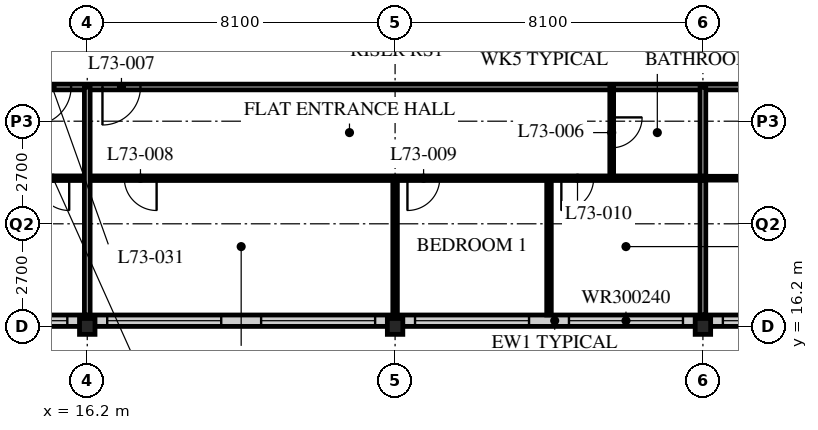
"""IFC4 building model, lengths in metres.
Left out: names, types, materials, properties, quantities, classifications, styles, units other than length and angle.
Written with IfcOpenShell. Run it as: python <this file> out.ifc"""

import sys

from ifc_helpers import new_model, si_unit, direction, frame, frame_2d, origin, origin_2d, place, context, subcontext, project, spatial, rectangle, i_section, extrude, element, fill, save


model = new_model("IFC4")
c1 = context("Model", 3, precision=1e-05, world=origin(), true_north=direction((0.0, 1.0)))
c2 = subcontext(c1, "Body", "Model", "MODEL_VIEW")
j1 = project(units=[si_unit("LENGTHUNIT", "METRE"), si_unit("PLANEANGLEUNIT", "RADIAN")], contexts=[c1])
p1 = place(None, origin())
s1 = spatial("IfcSite", under=j1, at=p1, CompositionType="ELEMENT")
p2 = place(p1, origin())
s2 = spatial("IfcBuilding", under=s1, at=p2, CompositionType="ELEMENT")
p3 = place(p2, frame((0.0, 0.0, 285.3)))
s3 = spatial("IfcBuildingStorey", under=s2, at=p3, CompositionType="ELEMENT", Elevation=285.3)
for number, where, z_axis, x_axis in (
    (1, (16.2, 16.2, 0.0), (0.0, 0.0, 1.0), (1.0, 0.0, 0.0)),
    (2, (24.3, 16.2, 0.0), (0.0, 0.0, 1.0), (1.0, 0.0, 0.0)),
    (3, (32.4, 16.2, 0.0), (0.0, 0.0, 1.0), (1.0, 0.0, 0.0)),
):
    element("IfcColumn", number, at=place(p3, frame(where, z_axis=z_axis, x_axis=x_axis)), inside=s3, PredefinedType="COLUMN", context=c2, shape_type="SweptSolid", body=[
        extrude(i_section(OverallWidth=0.407, OverallDepth=0.419, WebThickness=0.031, FlangeThickness=0.049, FilletRadius=0.015, at=origin_2d()), origin(), (0.0, 0.0, 1.0), 3.9),
    ])
p4 = place(p3, frame((8.4, 16.35, 0.0), z_axis=(0.0, 0.0, 1.0), x_axis=(1.0, 0.0, 0.0)))
e4 = element("IfcWall", 4, at=p4, inside=s3, PredefinedType="SOLIDWALL", context=c2, shape_type="SweptSolid", body=[
    extrude(rectangle(XDim=40.2, YDim=0.3, at=frame_2d((20.1, 0.0))), origin(), (0.0, 0.0, 1.0), 3.69),
])
p5 = place(p4, frame((0.225, 0.0, 0.6)))
e5 = element("IfcOpeningElement", 5, at=p5, cuts=e4, PredefinedType="OPENING", context=c2, shape_type="SweptSolid", body=[
    extrude(rectangle(XDim=3.0, YDim=2.4, at=frame_2d((1.5, 1.2))), frame((0.0, 0.16, 0.0), z_axis=(0.0, -1.0, 0.0), x_axis=(1.0, 0.0, 0.0)), (0.0, 0.0, 1.0), 0.32),
])
p6 = place(p4, frame((4.275, 0.0, 0.6)))
e6 = element("IfcOpeningElement", 6, at=p6, cuts=e4, PredefinedType="OPENING", context=c2, shape_type="SweptSolid", body=[
    extrude(rectangle(XDim=3.0, YDim=2.4, at=frame_2d((1.5, 1.2))), frame((0.0, 0.16, 0.0), z_axis=(0.0, -1.0, 0.0), x_axis=(1.0, 0.0, 0.0)), (0.0, 0.0, 1.0), 0.32),
])
p7 = place(p4, frame((8.325, 0.0, 0.6)))
e7 = element("IfcOpeningElement", 7, at=p7, cuts=e4, PredefinedType="OPENING", context=c2, shape_type="SweptSolid", body=[
    extrude(rectangle(XDim=3.0, YDim=2.4, at=frame_2d((1.5, 1.2))), frame((0.0, 0.16, 0.0), z_axis=(0.0, -1.0, 0.0), x_axis=(1.0, 0.0, 0.0)), (0.0, 0.0, 1.0), 0.32),
])
p8 = place(p4, frame((12.375, 0.0, 0.6)))
e8 = element("IfcOpeningElement", 8, at=p8, cuts=e4, PredefinedType="OPENING", context=c2, shape_type="SweptSolid", body=[
    extrude(rectangle(XDim=3.0, YDim=2.4, at=frame_2d((1.5, 1.2))), frame((0.0, 0.16, 0.0), z_axis=(0.0, -1.0, 0.0), x_axis=(1.0, 0.0, 0.0)), (0.0, 0.0, 1.0), 0.32),
])
p9 = place(p4, frame((16.425, 0.0, 0.6)))
e9 = element("IfcOpeningElement", 9, at=p9, cuts=e4, PredefinedType="OPENING", context=c2, shape_type="SweptSolid", body=[
    extrude(rectangle(XDim=3.0, YDim=2.4, at=frame_2d((1.5, 1.2))), frame((0.0, 0.16, 0.0), z_axis=(0.0, -1.0, 0.0), x_axis=(1.0, 0.0, 0.0)), (0.0, 0.0, 1.0), 0.32),
])
p10 = place(p4, frame((20.475, 0.0, 0.6)))
e10 = element("IfcOpeningElement", 10, at=p10, cuts=e4, PredefinedType="OPENING", context=c2, shape_type="SweptSolid", body=[
    extrude(rectangle(XDim=3.0, YDim=2.4, at=frame_2d((1.5, 1.2))), frame((0.0, 0.16, 0.0), z_axis=(0.0, -1.0, 0.0), x_axis=(1.0, 0.0, 0.0)), (0.0, 0.0, 1.0), 0.32),
])
p11 = place(p4, frame((24.525, 0.0, 0.6)))
e11 = element("IfcOpeningElement", 11, at=p11, cuts=e4, PredefinedType="OPENING", context=c2, shape_type="SweptSolid", body=[
    extrude(rectangle(XDim=3.0, YDim=2.4, at=frame_2d((1.5, 1.2))), frame((0.0, 0.16, 0.0), z_axis=(0.0, -1.0, 0.0), x_axis=(1.0, 0.0, 0.0)), (0.0, 0.0, 1.0), 0.32),
])
p12 = place(p4, frame((28.575, 0.0, 0.6)))
e12 = element("IfcOpeningElement", 12, at=p12, cuts=e4, PredefinedType="OPENING", context=c2, shape_type="SweptSolid", body=[
    extrude(rectangle(XDim=3.0, YDim=2.4, at=frame_2d((1.5, 1.2))), frame((0.0, 0.16, 0.0), z_axis=(0.0, -1.0, 0.0), x_axis=(1.0, 0.0, 0.0)), (0.0, 0.0, 1.0), 0.32),
])
p13 = place(p4, frame((32.625, 0.0, 0.6)))
e13 = element("IfcOpeningElement", 13, at=p13, cuts=e4, PredefinedType="OPENING", context=c2, shape_type="SweptSolid", body=[
    extrude(rectangle(XDim=3.0, YDim=2.4, at=frame_2d((1.5, 1.2))), frame((0.0, 0.16, 0.0), z_axis=(0.0, -1.0, 0.0), x_axis=(1.0, 0.0, 0.0)), (0.0, 0.0, 1.0), 0.32),
])
p14 = place(p4, frame((36.675, 0.0, 0.6)))
e14 = element("IfcOpeningElement", 14, at=p14, cuts=e4, PredefinedType="OPENING", context=c2, shape_type="SweptSolid", body=[
    extrude(rectangle(XDim=3.0, YDim=2.4, at=frame_2d((1.5, 1.2))), frame((0.0, 0.16, 0.0), z_axis=(0.0, -1.0, 0.0), x_axis=(1.0, 0.0, 0.0)), (0.0, 0.0, 1.0), 0.32),
])
p15 = place(p3, frame((12.15, 22.5, 0.0), z_axis=(0.0, 0.0, 1.0), x_axis=(1.0, 0.0, 0.0)))
e15 = element("IfcWall", 15, at=p15, inside=s3, PredefinedType="PARTITIONING", context=c2, shape_type="SweptSolid", body=[
    extrude(rectangle(XDim=24.3, YDim=0.15, at=frame_2d((12.15, 0.0))), origin(), (0.0, 0.0, 1.0), 3.69),
])
p16 = place(p15, frame((4.45, 0.0, 0.0)))
e16 = element("IfcOpeningElement", 16, at=p16, cuts=e15, PredefinedType="OPENING", context=c2, shape_type="SweptSolid", body=[
    extrude(rectangle(XDim=1.0, YDim=2.1, at=frame_2d((0.5, 1.05))), frame((0.0, 0.085, 0.0), z_axis=(0.0, -1.0, 0.0), x_axis=(1.0, 0.0, 0.0)), (0.0, 0.0, 1.0), 0.17),
])
p17 = place(p15, frame((22.6, 0.0, 0.0)))
e17 = element("IfcOpeningElement", 17, at=p17, cuts=e15, PredefinedType="OPENING", context=c2, shape_type="SweptSolid", body=[
    extrude(rectangle(XDim=1.0, YDim=2.1, at=frame_2d((0.5, 1.05))), frame((0.0, 0.085, 0.0), z_axis=(0.0, -1.0, 0.0), x_axis=(1.0, 0.0, 0.0)), (0.0, 0.0, 1.0), 0.17),
])
p18 = place(p15, frame((2.625, 0.0, 0.0)))
e18 = element("IfcOpeningElement", 18, at=p18, cuts=e15, PredefinedType="OPENING", context=c2, shape_type="SweptSolid", body=[
    extrude(rectangle(XDim=1.0, YDim=2.1, at=frame_2d((0.5, 1.05))), frame((0.0, 0.085, 0.0), z_axis=(0.0, -1.0, 0.0), x_axis=(1.0, 0.0, 0.0)), (0.0, 0.0, 1.0), 0.17),
])
p19 = place(p3, frame((30.0, 22.5, 0.0), z_axis=(0.0, 0.0, 1.0), x_axis=(0.0, -1.0, 0.0)))
e19 = element("IfcWall", 19, at=p19, inside=s3, PredefinedType="PARTITIONING", context=c2, shape_type="SweptSolid", body=[
    extrude(rectangle(XDim=2.4, YDim=0.1, at=frame_2d((1.2, 0.0))), origin(), (0.0, 0.0, 1.0), 3.69),
])
p20 = place(p19, frame((0.8, 0.0, 0.0)))
e20 = element("IfcOpeningElement", 20, at=p20, cuts=e19, PredefinedType="OPENING", context=c2, shape_type="SweptSolid", body=[
    extrude(rectangle(XDim=0.8, YDim=2.1, at=frame_2d((0.4, 1.05))), frame((0.0, 0.06, 0.0), z_axis=(0.0, -1.0, 0.0), x_axis=(1.0, 0.0, 0.0)), (0.0, 0.0, 1.0), 0.12),
])
p21 = place(p3, frame((24.3, 20.1, 0.0), z_axis=(0.0, 0.0, 1.0), x_axis=(0.0, -1.0, 0.0)))
e21 = element("IfcWall", 21, at=p21, inside=s3, PredefinedType="PARTITIONING", context=c2, shape_type="SweptSolid", body=[
    extrude(rectangle(XDim=3.6, YDim=0.12, at=frame_2d((1.8, 0.0))), origin(), (0.0, 0.0, 1.0), 3.078),
])
p22 = place(p3, frame((28.35, 20.1, 0.0), z_axis=(0.0, 0.0, 1.0), x_axis=(0.0, -1.0, 0.0)))
e22 = element("IfcWall", 22, at=p22, inside=s3, PredefinedType="PARTITIONING", context=c2, shape_type="SweptSolid", body=[
    extrude(rectangle(XDim=3.6, YDim=0.12, at=frame_2d((1.8, 0.0))), origin(), (0.0, 0.0, 1.0), 3.69),
])
p23 = place(p3, frame((32.4, 22.5, 0.0), z_axis=(0.0, 0.0, 1.0), x_axis=(0.0, -1.0, 0.0)))
e23 = element("IfcWall", 23, at=p23, inside=s3, PredefinedType="PARTITIONING", context=c2, shape_type="SweptSolid", body=[
    extrude(rectangle(XDim=6.0, YDim=0.15, at=frame_2d((3.0, 0.0))), origin(), (0.0, 0.0, 1.0), 3.078),
])
p24 = place(p3, frame((32.4, 20.1, 0.0), z_axis=(0.0, 0.0, 1.0), x_axis=(1.0, 0.0, 0.0)))
e24 = element("IfcWall", 24, at=p24, inside=s3, PredefinedType="PARTITIONING", context=c2, shape_type="SweptSolid", body=[
    extrude(rectangle(XDim=2.2, YDim=0.1, at=frame_2d((1.1, 0.0))), origin(), (0.0, 0.0, 1.0), 3.69),
])
p25 = place(p3, frame((12.15, 20.1, 0.0), z_axis=(0.0, 0.0, 1.0), x_axis=(1.0, 0.0, 0.0)))
e25 = element("IfcWall", 25, at=p25, inside=s3, PredefinedType="PARTITIONING", context=c2, shape_type="SweptSolid", body=[
    extrude(rectangle(XDim=20.25, YDim=0.12, at=frame_2d((10.125, 0.0))), origin(), (0.0, 0.0, 1.0), 3.69),
])
p26 = place(p25, frame((5.025, 0.0, 0.0)))
e26 = element("IfcOpeningElement", 26, at=p26, cuts=e25, PredefinedType="OPENING", context=c2, shape_type="SweptSolid", body=[
    extrude(rectangle(XDim=0.85, YDim=2.1, at=frame_2d((0.425, 1.05))), frame((0.0, 0.07, 0.0), z_axis=(0.0, -1.0, 0.0), x_axis=(1.0, 0.0, 0.0)), (0.0, 0.0, 1.0), 0.14),
])
p27 = place(p25, frame((12.475, 0.0, 0.0)))
e27 = element("IfcOpeningElement", 27, at=p27, cuts=e25, PredefinedType="OPENING", context=c2, shape_type="SweptSolid", body=[
    extrude(rectangle(XDim=0.85, YDim=2.1, at=frame_2d((0.425, 1.05))), frame((0.0, 0.07, 0.0), z_axis=(0.0, -1.0, 0.0), x_axis=(1.0, 0.0, 0.0)), (0.0, 0.0, 1.0), 0.14),
])
p28 = place(p25, frame((16.525, 0.0, 0.0)))
e28 = element("IfcOpeningElement", 28, at=p28, cuts=e25, PredefinedType="OPENING", context=c2, shape_type="SweptSolid", body=[
    extrude(rectangle(XDim=0.85, YDim=2.1, at=frame_2d((0.425, 1.05))), frame((0.0, 0.07, 0.0), z_axis=(0.0, -1.0, 0.0), x_axis=(1.0, 0.0, 0.0)), (0.0, 0.0, 1.0), 0.14),
])
p29 = place(p25, frame((2.725, 0.0, 0.0)))
e29 = element("IfcOpeningElement", 29, at=p29, cuts=e25, PredefinedType="OPENING", context=c2, shape_type="SweptSolid", body=[
    extrude(rectangle(XDim=0.85, YDim=2.1, at=frame_2d((0.425, 1.05))), frame((0.0, 0.07, 0.0), z_axis=(0.0, -1.0, 0.0), x_axis=(1.0, 0.0, 0.0)), (0.0, 0.0, 1.0), 0.14),
])
p30 = place(p3, frame((16.2, 22.5, 0.0), z_axis=(0.0, 0.0, 1.0), x_axis=(0.0, -1.0, 0.0)))
e30 = element("IfcWall", 30, at=p30, inside=s3, PredefinedType="PARTITIONING", context=c2, shape_type="SweptSolid", body=[
    extrude(rectangle(XDim=6.0, YDim=0.15, at=frame_2d((3.0, 0.0))), origin(), (0.0, 0.0, 1.0), 3.078),
])
p31 = place(p6, origin())
e31 = element("IfcWindow", 31, at=p31, inside=s3, PartitioningType="SINGLE_PANEL", PredefinedType="WINDOW", context=c2, shape_type="SweptSolid", body=[
    extrude(rectangle(XDim=3.0, YDim=2.4, at=frame_2d((1.5, 1.2))), frame((0.0, 0.03, 0.0), z_axis=(0.0, -1.0, 0.0), x_axis=(1.0, 0.0, 0.0)), (0.0, 0.0, 1.0), 0.06),
])
fill(e6, e31)
p32 = place(p7, origin())
e32 = element("IfcWindow", 32, at=p32, inside=s3, PartitioningType="SINGLE_PANEL", PredefinedType="WINDOW", context=c2, shape_type="SweptSolid", body=[
    extrude(rectangle(XDim=3.0, YDim=2.4, at=frame_2d((1.5, 1.2))), frame((0.0, 0.03, 0.0), z_axis=(0.0, -1.0, 0.0), x_axis=(1.0, 0.0, 0.0)), (0.0, 0.0, 1.0), 0.06),
])
fill(e7, e32)
p33 = place(p8, origin())
e33 = element("IfcWindow", 33, at=p33, inside=s3, PartitioningType="SINGLE_PANEL", PredefinedType="WINDOW", context=c2, shape_type="SweptSolid", body=[
    extrude(rectangle(XDim=3.0, YDim=2.4, at=frame_2d((1.5, 1.2))), frame((0.0, 0.03, 0.0), z_axis=(0.0, -1.0, 0.0), x_axis=(1.0, 0.0, 0.0)), (0.0, 0.0, 1.0), 0.06),
])
fill(e8, e33)
p34 = place(p9, origin())
e34 = element("IfcWindow", 34, at=p34, inside=s3, PartitioningType="SINGLE_PANEL", PredefinedType="WINDOW", context=c2, shape_type="SweptSolid", body=[
    extrude(rectangle(XDim=3.0, YDim=2.4, at=frame_2d((1.5, 1.2))), frame((0.0, 0.03, 0.0), z_axis=(0.0, -1.0, 0.0), x_axis=(1.0, 0.0, 0.0)), (0.0, 0.0, 1.0), 0.06),
])
fill(e9, e34)
p35 = place(p10, origin())
e35 = element("IfcWindow", 35, at=p35, inside=s3, PartitioningType="SINGLE_PANEL", PredefinedType="WINDOW", context=c2, shape_type="SweptSolid", body=[
    extrude(rectangle(XDim=3.0, YDim=2.4, at=frame_2d((1.5, 1.2))), frame((0.0, 0.03, 0.0), z_axis=(0.0, -1.0, 0.0), x_axis=(1.0, 0.0, 0.0)), (0.0, 0.0, 1.0), 0.06),
])
fill(e10, e35)
p36 = place(p11, origin())
e36 = element("IfcWindow", 36, at=p36, inside=s3, PartitioningType="SINGLE_PANEL", PredefinedType="WINDOW", context=c2, shape_type="SweptSolid", body=[
    extrude(rectangle(XDim=3.0, YDim=2.4, at=frame_2d((1.5, 1.2))), frame((0.0, 0.03, 0.0), z_axis=(0.0, -1.0, 0.0), x_axis=(1.0, 0.0, 0.0)), (0.0, 0.0, 1.0), 0.06),
])
fill(e11, e36)
p37 = place(p20, origin())
e37 = element("IfcDoor", 37, at=p37, inside=s3, OperationType="SINGLE_SWING_LEFT", PredefinedType="DOOR", context=c2, shape_type="SweptSolid", body=[
    extrude(rectangle(XDim=0.8, YDim=2.1, at=frame_2d((0.4, 1.05))), frame((0.0, 0.025, 0.0), z_axis=(0.0, -1.0, 0.0), x_axis=(1.0, 0.0, 0.0)), (0.0, 0.0, 1.0), 0.05),
])
fill(e20, e37)
p38 = place(p16, origin())
e38 = element("IfcDoor", 38, at=p38, inside=s3, OperationType="SINGLE_SWING_RIGHT", PredefinedType="DOOR", context=c2, shape_type="SweptSolid", body=[
    extrude(rectangle(XDim=1.0, YDim=2.1, at=frame_2d((0.5, 1.05))), frame((0.0, 0.025, 0.0), z_axis=(0.0, -1.0, 0.0), x_axis=(1.0, 0.0, 0.0)), (0.0, 0.0, 1.0), 0.05),
])
fill(e16, e38)
p39 = place(p26, origin())
e39 = element("IfcDoor", 39, at=p39, inside=s3, OperationType="SINGLE_SWING_LEFT", PredefinedType="DOOR", context=c2, shape_type="SweptSolid", body=[
    extrude(rectangle(XDim=0.85, YDim=2.1, at=frame_2d((0.425, 1.05))), frame((0.0, 0.025, 0.0), z_axis=(0.0, -1.0, 0.0), x_axis=(1.0, 0.0, 0.0)), (0.0, 0.0, 1.0), 0.05),
])
fill(e26, e39)
p40 = place(p27, origin())
e40 = element("IfcDoor", 40, at=p40, inside=s3, OperationType="SINGLE_SWING_RIGHT", PredefinedType="DOOR", context=c2, shape_type="SweptSolid", body=[
    extrude(rectangle(XDim=0.85, YDim=2.1, at=frame_2d((0.425, 1.05))), frame((0.0, 0.025, 0.0), z_axis=(0.0, -1.0, 0.0), x_axis=(1.0, 0.0, 0.0)), (0.0, 0.0, 1.0), 0.05),
])
fill(e27, e40)
p41 = place(p28, origin())
e41 = element("IfcDoor", 41, at=p41, inside=s3, OperationType="SINGLE_SWING_RIGHT", PredefinedType="DOOR", context=c2, shape_type="SweptSolid", body=[
    extrude(rectangle(XDim=0.85, YDim=2.1, at=frame_2d((0.425, 1.05))), frame((0.0, 0.025, 0.0), z_axis=(0.0, -1.0, 0.0), x_axis=(1.0, 0.0, 0.0)), (0.0, 0.0, 1.0), 0.05),
])
fill(e28, e41)
p42 = place(p18, origin())
e42 = element("IfcDoor", 42, at=p42, inside=s3, OperationType="SINGLE_SWING_RIGHT", PredefinedType="DOOR", context=c2, shape_type="SweptSolid", body=[
    extrude(rectangle(XDim=1.0, YDim=2.1, at=frame_2d((0.5, 1.05))), frame((0.0, 0.025, 0.0), z_axis=(0.0, -1.0, 0.0), x_axis=(1.0, 0.0, 0.0)), (0.0, 0.0, 1.0), 0.05),
])
fill(e18, e42)
p43 = place(p29, origin())
e43 = element("IfcDoor", 43, at=p43, inside=s3, OperationType="SINGLE_SWING_LEFT", PredefinedType="DOOR", context=c2, shape_type="SweptSolid", body=[
    extrude(rectangle(XDim=0.85, YDim=2.1, at=frame_2d((0.425, 1.05))), frame((0.0, 0.025, 0.0), z_axis=(0.0, -1.0, 0.0), x_axis=(1.0, 0.0, 0.0)), (0.0, 0.0, 1.0), 0.05),
])
fill(e29, e43)
save(model, sys.argv[1])
